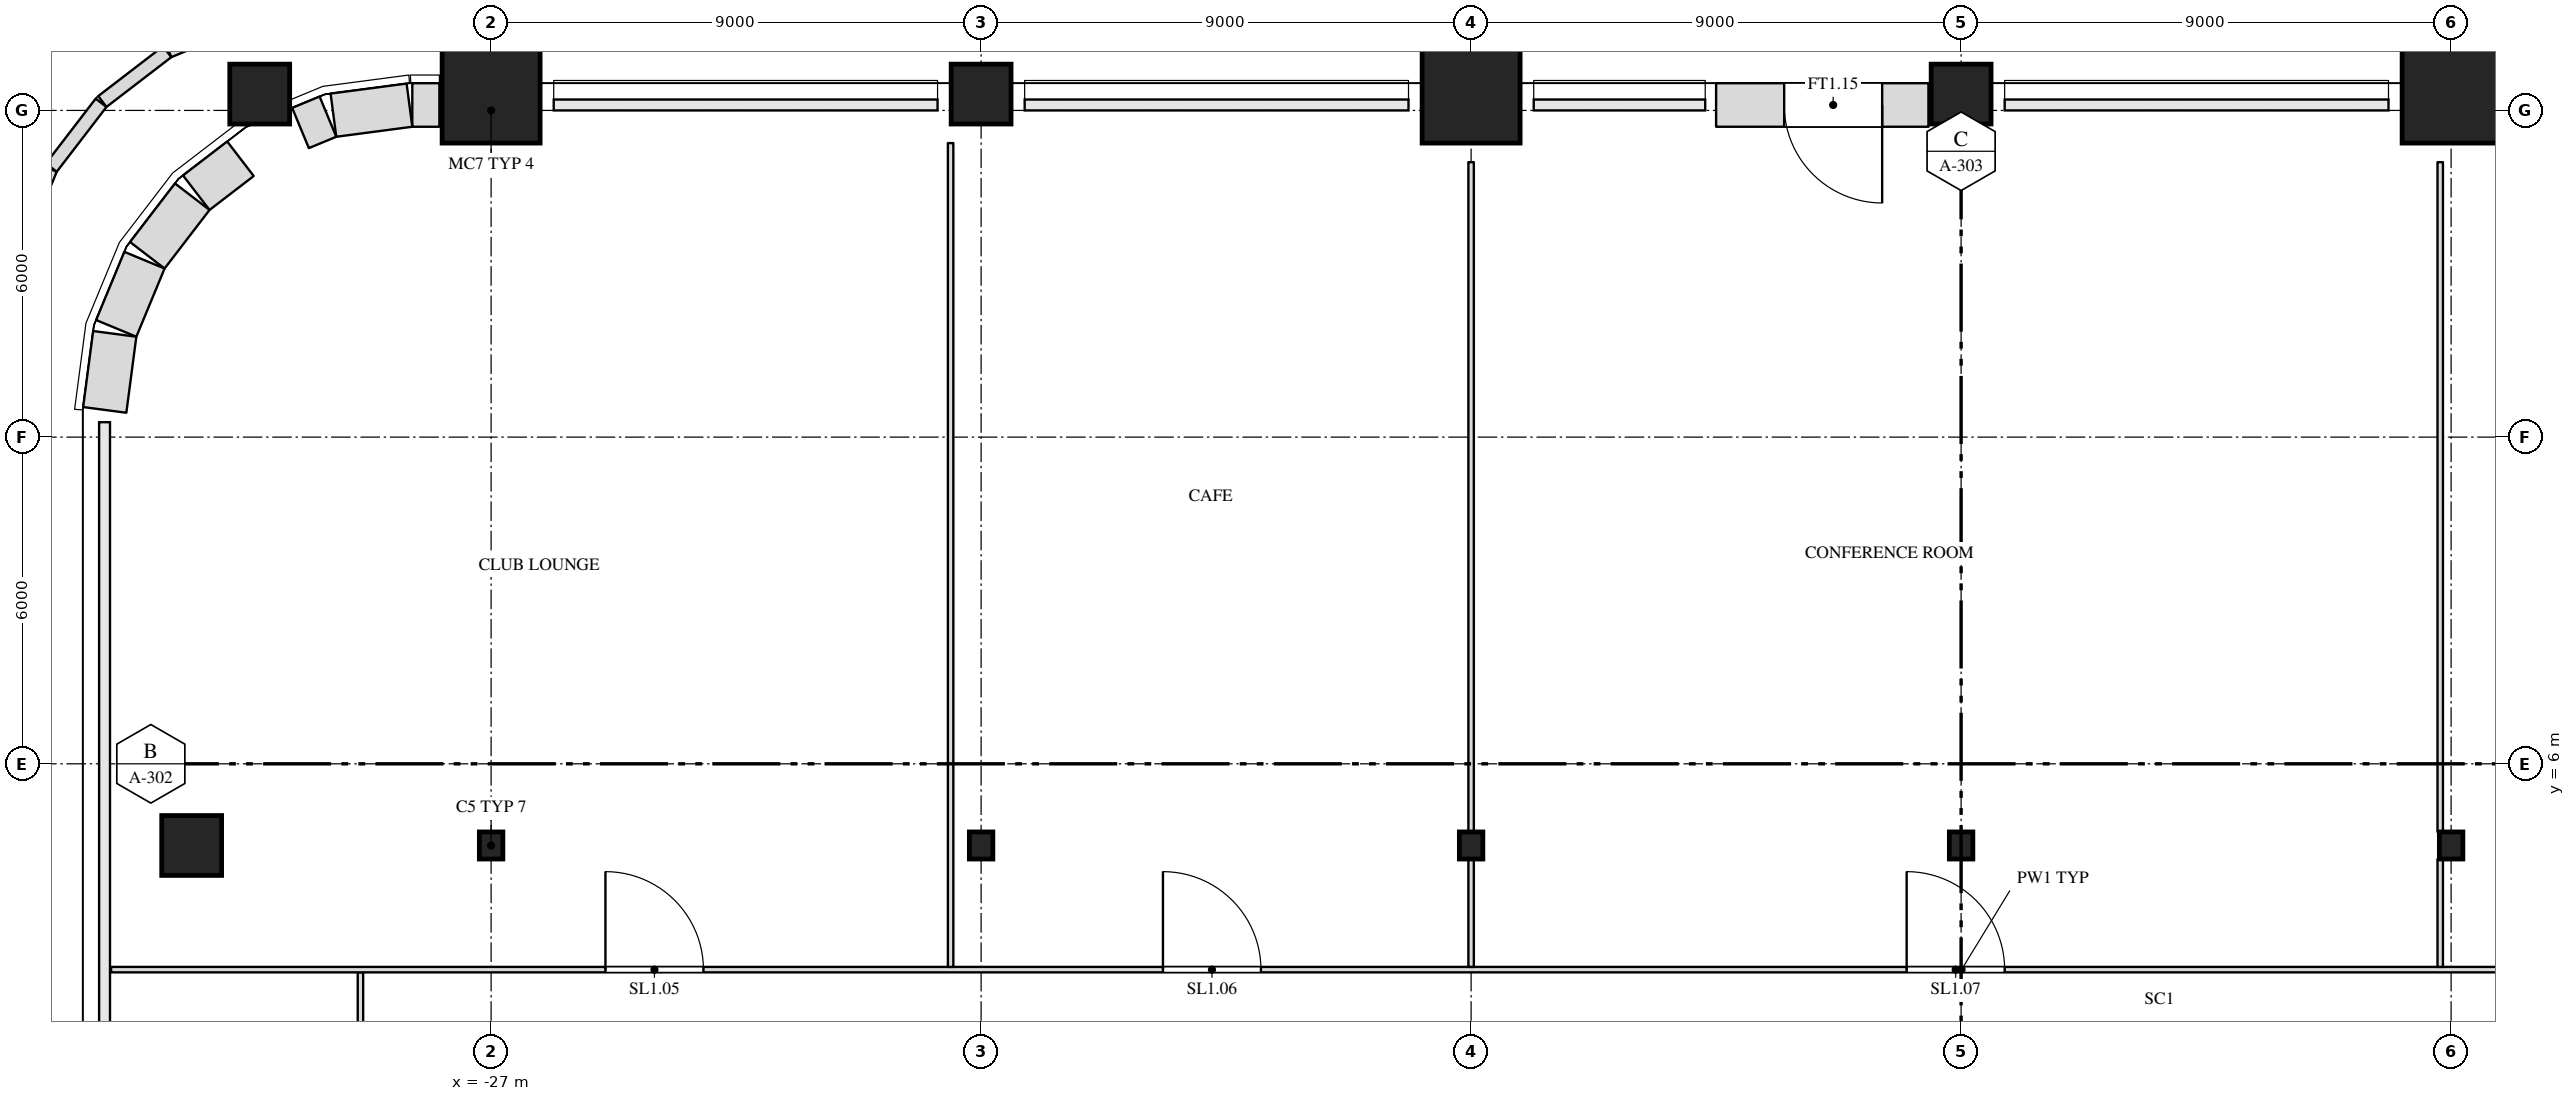
"""IFC4 building model, lengths in metres.
Left out: names, types, materials, properties, quantities, classifications, styles, units other than length and angle.
Written with IfcOpenShell. Run it as: python <this file> out.ifc"""

import sys

from ifc_helpers import new_model, si_unit, direction, frame, frame_2d, origin, origin_2d, place, context, subcontext, project, spatial, rectangle, i_section, extrude, clip, halfspace, element, fill, save


model = new_model("IFC4")
c1 = context("Model", 3, precision=1e-05, world=origin(), true_north=direction((0.0, 1.0)))
c2 = subcontext(c1, "Body", "Model", "MODEL_VIEW")
j1 = project(units=[si_unit("LENGTHUNIT", "METRE"), si_unit("PLANEANGLEUNIT", "RADIAN")], contexts=[c1])
p1 = place(None, origin())
s1 = spatial("IfcSite", under=j1, at=p1, CompositionType="ELEMENT")
p2 = place(p1, origin())
s2 = spatial("IfcBuilding", under=s1, at=p2, CompositionType="ELEMENT")
p3 = place(p2, frame((0.0, 0.0, 100.5)))
s3 = spatial("IfcBuildingStorey", under=s2, at=p3, CompositionType="ELEMENT", Elevation=100.5)
p4 = place(p3, frame((-32.5, 4.5, 0.0), z_axis=(0.0, 0.0, 1.0), x_axis=(1.0, 0.0, 0.0)))
e1 = element("IfcColumn", 1, at=p4, inside=s3, PredefinedType="COLUMN", context=c2, shape_type="SweptSolid", body=[
    extrude(rectangle(XDim=1.1, YDim=1.1, at=origin_2d()), origin(), (0.0, 0.0, 1.0), 4.0),
])
for number, where, z_axis, x_axis in (
    (2, (-27.0, 4.5, 0.0), (0.0, 0.0, 1.0), (1.0, 0.0, 0.0)),
    (3, (-18.0, 4.5, 0.0), (0.0, 0.0, 1.0), (1.0, 0.0, 0.0)),
    (4, (-9.0, 4.5, 0.0), (0.0, 0.0, 1.0), (1.0, 0.0, 0.0)),
    (5, (0.0, 4.5, 0.0), (0.0, 0.0, 1.0), (1.0, 0.0, 0.0)),
    (6, (9.0, 4.5, 0.0), (0.0, 0.0, 1.0), (1.0, 0.0, 0.0)),
):
    element("IfcColumn", number, at=place(p3, frame(where, z_axis=z_axis, x_axis=x_axis)), inside=s3, PredefinedType="COLUMN", context=c2, shape_type="SweptSolid", body=[
        extrude(i_section(OverallWidth=0.432, OverallDepth=0.498, WebThickness=0.056, FlangeThickness=0.089, at=origin_2d()), origin(), (0.0, 0.0, 1.0), 4.0),
    ])
p5 = place(p3, frame((-31.25, 18.0, 0.0), z_axis=(0.0, 0.242535625036, 0.970142500145), x_axis=(-1.0, 0.0, 0.0)))
e7 = element("IfcColumn", 7, at=p5, inside=s3, PredefinedType="COLUMN", context=c2, shape_type="Clipping", body=[
    clip(extrude(rectangle(XDim=1.1, YDim=1.1, at=origin_2d()), origin(), (0.0, 0.0, 1.0), 4.123), halfspace(frame((0.0, 0.0, 0.137)), True)),
])
p6 = place(p3, frame((-27.0, 18.0, 0.0), z_axis=(0.0, 0.242535625036, 0.970142500145), x_axis=(-1.0, 0.0, 0.0)))
e8 = element("IfcColumn", 8, at=p6, inside=s3, PredefinedType="COLUMN", context=c2, shape_type="Clipping", body=[
    clip(extrude(rectangle(XDim=1.8, YDim=1.8, at=origin_2d()), origin(), (0.0, 0.0, 1.0), 4.123), halfspace(frame((0.0, 0.0, 0.225)), True)),
])
p7 = place(p3, frame((-18.0, 18.0, 0.0), z_axis=(0.0, 0.242535625036, 0.970142500145), x_axis=(-1.0, 0.0, 0.0)))
e9 = element("IfcColumn", 9, at=p7, inside=s3, PredefinedType="COLUMN", context=c2, shape_type="Clipping", body=[
    clip(extrude(rectangle(XDim=1.1, YDim=1.1, at=origin_2d()), origin(), (0.0, 0.0, 1.0), 4.123), halfspace(frame((0.0, 0.0, 0.137)), True)),
])
p8 = place(p3, frame((-9.0, 18.0, 0.0), z_axis=(0.0, 0.242535625036, 0.970142500145), x_axis=(-1.0, 0.0, 0.0)))
e10 = element("IfcColumn", 10, at=p8, inside=s3, PredefinedType="COLUMN", context=c2, shape_type="Clipping", body=[
    clip(extrude(rectangle(XDim=1.8, YDim=1.8, at=origin_2d()), origin(), (0.0, 0.0, 1.0), 4.123), halfspace(frame((0.0, 0.0, 0.225)), True)),
])
p9 = place(p3, frame((0.0, 18.0, 0.0), z_axis=(0.0, 0.242535625036, 0.970142500145), x_axis=(-1.0, 0.0, 0.0)))
e11 = element("IfcColumn", 11, at=p9, inside=s3, PredefinedType="COLUMN", context=c2, shape_type="Clipping", body=[
    clip(extrude(rectangle(XDim=1.1, YDim=1.1, at=origin_2d()), origin(), (0.0, 0.0, 1.0), 4.123), halfspace(frame((0.0, 0.0, 0.137)), True)),
])
p10 = place(p3, frame((9.0, 18.0, 0.0), z_axis=(0.0, 0.242535625036, 0.970142500145), x_axis=(-1.0, 0.0, 0.0)))
e12 = element("IfcColumn", 12, at=p10, inside=s3, PredefinedType="COLUMN", context=c2, shape_type="Clipping", body=[
    clip(extrude(rectangle(XDim=1.8, YDim=1.8, at=origin_2d()), origin(), (0.0, 0.0, 1.0), 4.123), halfspace(frame((0.0, 0.0, 0.225)), True)),
])
p11 = place(p3, frame((-29.4, -13.95, 0.0), z_axis=(0.0, 0.0, 1.0), x_axis=(0.0, 1.0, 0.0)))
e13 = element("IfcWall", 13, at=p11, inside=s3, PredefinedType="PARTITIONING", context=c2, shape_type="SweptSolid", body=[
    extrude(rectangle(XDim=16.12, YDim=0.1, at=frame_2d((8.06, 0.0))), origin(), (0.0, 0.0, 1.0), 3.65),
])
p12 = place(p11, frame((7.55, 0.0, 0.0)))
e14 = element("IfcOpeningElement", 14, at=p12, cuts=e13, PredefinedType="OPENING", context=c2, shape_type="SweptSolid", body=[
    extrude(rectangle(XDim=1.0, YDim=2.1, at=frame_2d((0.5, 1.05))), frame((0.0, 0.062, 0.0), z_axis=(0.0, -1.0, 0.0), x_axis=(1.0, 0.0, 0.0)), (0.0, 0.0, 1.0), 0.124),
])
p13 = place(p3, frame((-33.98, 2.22, 0.0), z_axis=(0.0, 0.0, 1.0), x_axis=(1.0, 0.0, 0.0)))
e15 = element("IfcWall", 15, at=p13, inside=s3, PredefinedType="PARTITIONING", context=c2, shape_type="SweptSolid", body=[
    extrude(rectangle(XDim=67.976, YDim=0.1, at=frame_2d((33.988, 0.0))), origin(), (0.0, 0.0, 1.0), 3.65),
])
p14 = place(p13, frame((9.08, 0.0, 0.0)))
e16 = element("IfcOpeningElement", 16, at=p14, cuts=e15, PredefinedType="OPENING", context=c2, shape_type="SweptSolid", body=[
    extrude(rectangle(XDim=1.8, YDim=2.1, at=frame_2d((0.9, 1.05))), frame((0.0, 0.062, 0.0), z_axis=(0.0, -1.0, 0.0), x_axis=(1.0, 0.0, 0.0)), (0.0, 0.0, 1.0), 0.124),
])
p15 = place(p13, frame((19.32, 0.0, 0.0)))
e17 = element("IfcOpeningElement", 17, at=p15, cuts=e15, PredefinedType="OPENING", context=c2, shape_type="SweptSolid", body=[
    extrude(rectangle(XDim=1.8, YDim=2.1, at=frame_2d((0.9, 1.05))), frame((0.0, 0.062, 0.0), z_axis=(0.0, -1.0, 0.0), x_axis=(1.0, 0.0, 0.0)), (0.0, 0.0, 1.0), 0.124),
])
p16 = place(p13, frame((32.98, 0.0, 0.0)))
e18 = element("IfcOpeningElement", 18, at=p16, cuts=e15, PredefinedType="OPENING", context=c2, shape_type="SweptSolid", body=[
    extrude(rectangle(XDim=1.8, YDim=2.1, at=frame_2d((0.9, 1.05))), frame((0.0, 0.062, 0.0), z_axis=(0.0, -1.0, 0.0), x_axis=(1.0, 0.0, 0.0)), (0.0, 0.0, 1.0), 0.124),
])
p17 = place(p13, frame((52.03, 0.0, 0.0)))
e19 = element("IfcOpeningElement", 19, at=p17, cuts=e15, PredefinedType="OPENING", context=c2, shape_type="SweptSolid", body=[
    extrude(rectangle(XDim=1.0, YDim=2.1, at=frame_2d((0.5, 1.05))), frame((0.0, 0.062, 0.0), z_axis=(0.0, -1.0, 0.0), x_axis=(1.0, 0.0, 0.0)), (0.0, 0.0, 1.0), 0.124),
])
p18 = place(p13, frame((59.5, 0.0, 0.0)))
e20 = element("IfcOpeningElement", 20, at=p18, cuts=e15, PredefinedType="OPENING", context=c2, shape_type="SweptSolid", body=[
    extrude(rectangle(XDim=1.8, YDim=2.1, at=frame_2d((0.9, 1.05))), frame((0.0, 0.062, 0.0), z_axis=(0.0, -1.0, 0.0), x_axis=(1.0, 0.0, 0.0)), (0.0, 0.0, 1.0), 0.124),
])
p19 = place(p3, frame((-18.56, 2.27, 0.0), z_axis=(0.0, 0.0, 1.0), x_axis=(0.0, 1.0, 0.0)))
e21 = element("IfcWall", 21, at=p19, inside=s3, PredefinedType="PARTITIONING", context=c2, shape_type="SweptSolid", body=[
    extrude(rectangle(XDim=15.13, YDim=0.1, at=frame_2d((7.565, 0.0))), origin(), (0.0, 0.0, 1.0), 3.65),
])
p20 = place(p3, frame((-9.0, 2.27, 0.0), z_axis=(0.0, 0.0, 1.0), x_axis=(0.0, 1.0, 0.0)))
e22 = element("IfcWall", 22, at=p20, inside=s3, PredefinedType="PARTITIONING", context=c2, shape_type="SweptSolid", body=[
    extrude(rectangle(XDim=1.981, YDim=0.1, at=frame_2d((0.99, 0.0))), origin(), (0.0, 0.0, 1.0), 3.65),
])
p21 = place(p3, frame((-9.0, 4.749, 0.0), z_axis=(0.0, 0.0, 1.0), x_axis=(0.0, 1.0, 0.0)))
e23 = element("IfcWall", 23, at=p21, inside=s3, PredefinedType="PARTITIONING", context=c2, shape_type="SweptSolid", body=[
    extrude(rectangle(XDim=12.301, YDim=0.1, at=frame_2d((6.15, 0.0))), origin(), (0.0, 0.0, 1.0), 3.65),
])
p22 = place(p3, frame((8.8, 2.27, 0.0), z_axis=(0.0, 0.0, 1.0), x_axis=(0.0, 1.0, 0.0)))
e24 = element("IfcWall", 24, at=p22, inside=s3, PredefinedType="PARTITIONING", context=c2, shape_type="SweptSolid", body=[
    extrude(rectangle(XDim=1.981, YDim=0.1, at=frame_2d((0.99, 0.0))), origin(), (0.0, 0.0, 1.0), 3.65),
])
p23 = place(p3, frame((8.8, 4.749, 0.0), z_axis=(0.0, 0.0, 1.0), x_axis=(0.0, 1.0, 0.0)))
e25 = element("IfcWall", 25, at=p23, inside=s3, PredefinedType="PARTITIONING", context=c2, shape_type="SweptSolid", body=[
    extrude(rectangle(XDim=12.301, YDim=0.1, at=frame_2d((6.15, 0.0))), origin(), (0.0, 0.0, 1.0), 3.65),
])
p24 = place(p3, frame((-0.6, 18.1, 0.0), z_axis=(0.0, 0.0, 1.0), x_axis=(-1.0, 0.0, 0.0)))
e26 = element("IfcWall", 26, at=p24, inside=s3, PredefinedType="SOLIDWALL", context=c2, shape_type="SweptSolid", body=[
    extrude(rectangle(XDim=3.9, YDim=0.8, at=frame_2d((1.95, 0.0))), origin(), (0.0, 0.0, 1.0), 3.65),
])
p25 = place(p24, frame((0.85, 0.0, 0.0)))
e27 = element("IfcOpeningElement", 27, at=p25, cuts=e26, PredefinedType="OPENING", context=c2, shape_type="SweptSolid", body=[
    extrude(rectangle(XDim=1.8, YDim=2.4, at=frame_2d((0.9, 1.2))), frame((0.0, 0.412, 0.0), z_axis=(0.0, -1.0, 0.0), x_axis=(1.0, 0.0, 0.0)), (0.0, 0.0, 1.0), 0.824),
])
p26 = place(p3, frame((-27.95, 18.1, 0.0), z_axis=(0.0, 0.0, 1.0), x_axis=(-1.0, 0.0, 0.0)))
e28 = element("IfcWall", 28, at=p26, inside=s3, PredefinedType="SOLIDWALL", context=c2, shape_type="SweptSolid", body=[
    extrude(rectangle(XDim=0.498, YDim=0.8, at=frame_2d((0.249, 0.0))), origin(), (0.0, 0.0, 1.0), 3.65),
])
p27 = place(p3, frame((-28.5, 18.097, 0.0), z_axis=(0.0, 0.0, 1.0), x_axis=(-0.99144603414, -0.130517283865, 0.0)))
e29 = element("IfcWall", 29, at=p27, inside=s3, PredefinedType="SOLIDWALL", context=c2, shape_type="SweptSolid", body=[
    extrude(rectangle(XDim=1.408, YDim=0.8, at=frame_2d((0.704, 0.0))), origin(), (0.0, 0.0, 1.0), 3.65),
])
p28 = place(p3, frame((-29.997, 17.886, 0.0), z_axis=(0.0, 0.0, 1.0), x_axis=(-0.923738247693, -0.383024346158, 0.0)))
e30 = element("IfcWall", 30, at=p28, inside=s3, PredefinedType="SOLIDWALL", context=c2, shape_type="SweptSolid", body=[
    extrude(rectangle(XDim=0.545, YDim=0.8, at=frame_2d((0.272, 0.0))), origin(), (0.0, 0.0, 1.0), 3.65),
])
p29 = place(p3, frame((-31.604, 17.112, 0.0), z_axis=(0.0, 0.0, 1.0), x_axis=(-0.793191379171, -0.608972442733, 0.0)))
e31 = element("IfcWall", 31, at=p29, inside=s3, PredefinedType="SOLIDWALL", context=c2, shape_type="SweptSolid", body=[
    extrude(rectangle(XDim=1.023, YDim=0.8, at=frame_2d((0.512, 0.0))), origin(), (0.0, 0.0, 1.0), 3.65),
])
p30 = place(p3, frame((-32.489, 16.416, 0.0), z_axis=(0.0, 0.0, 1.0), x_axis=(-0.608866226366, -0.793272915452, 0.0)))
e32 = element("IfcWall", 32, at=p30, inside=s3, PredefinedType="SOLIDWALL", context=c2, shape_type="SweptSolid", body=[
    extrude(rectangle(XDim=1.356, YDim=0.8, at=frame_2d((0.678, 0.0))), origin(), (0.0, 0.0, 1.0), 3.65),
])
p31 = place(p3, frame((-33.367, 15.25, 0.0), z_axis=(0.0, 0.0, 1.0), x_axis=(-0.38276009378, -0.923847774587, 0.0)))
e33 = element("IfcWall", 33, at=p31, inside=s3, PredefinedType="SOLIDWALL", context=c2, shape_type="SweptSolid", body=[
    extrude(rectangle(XDim=1.355, YDim=0.8, at=frame_2d((0.678, 0.0))), origin(), (0.0, 0.0, 1.0), 3.65),
])
p32 = place(p3, frame((-33.913, 13.896, 0.0), z_axis=(0.0, 0.0, 1.0), x_axis=(-0.130517283865, -0.99144603414, 0.0)))
e34 = element("IfcWall", 34, at=p32, inside=s3, PredefinedType="SOLIDWALL", context=c2, shape_type="SweptSolid", body=[
    extrude(rectangle(XDim=1.408, YDim=0.8, at=frame_2d((0.704, 0.0))), origin(), (0.0, 0.0, 1.0), 3.65),
])
for number, where, z_axis, x_axis in (
    (35, (-31.535, 19.667, 0.0), (0.0, 0.0, 1.0), (-0.924, -0.383, 0.0)),
    (36, (-32.95, 19.077, 0.0), (0.0, 0.0, 1.0), (-0.793, -0.609, 0.0)),
    (37, (-34.164, 18.14, 0.0), (0.0, 0.0, 1.0), (-0.609, -0.793, 0.0)),
    (38, (-35.093, 16.922, 0.0), (0.0, 0.0, 1.0), (-0.383, -0.924, 0.0)),
):
    element("IfcWall", number, at=place(p3, frame(where, z_axis=z_axis, x_axis=x_axis)), inside=s3, PredefinedType="PARAPET", context=c2, shape_type="SweptSolid", body=[
        extrude(rectangle(XDim=1.5, YDim=0.25, at=frame_2d((0.75, 0.0))), origin(), (0.0, 0.0, 1.0), 1.1),
    ])
p33 = place(p14, origin())
e39 = element("IfcDoor", 39, at=p33, inside=s3, OperationType="DOUBLE_DOOR_SINGLE_SWING", PredefinedType="DOOR", context=c2, shape_type="SweptSolid", body=[
    extrude(rectangle(XDim=1.8, YDim=2.1, at=frame_2d((0.9, 1.05))), frame((0.0, 0.025, 0.0), z_axis=(0.0, -1.0, 0.0), x_axis=(1.0, 0.0, 0.0)), (0.0, 0.0, 1.0), 0.05),
])
fill(e16, e39)
p34 = place(p15, origin())
e40 = element("IfcDoor", 40, at=p34, inside=s3, OperationType="DOUBLE_DOOR_SINGLE_SWING", PredefinedType="DOOR", context=c2, shape_type="SweptSolid", body=[
    extrude(rectangle(XDim=1.8, YDim=2.1, at=frame_2d((0.9, 1.05))), frame((0.0, 0.025, 0.0), z_axis=(0.0, -1.0, 0.0), x_axis=(1.0, 0.0, 0.0)), (0.0, 0.0, 1.0), 0.05),
])
fill(e17, e40)
p35 = place(p16, origin())
e41 = element("IfcDoor", 41, at=p35, inside=s3, OperationType="DOUBLE_DOOR_SINGLE_SWING", PredefinedType="DOOR", context=c2, shape_type="SweptSolid", body=[
    extrude(rectangle(XDim=1.8, YDim=2.1, at=frame_2d((0.9, 1.05))), frame((0.0, 0.025, 0.0), z_axis=(0.0, -1.0, 0.0), x_axis=(1.0, 0.0, 0.0)), (0.0, 0.0, 1.0), 0.05),
])
fill(e18, e41)
p36 = place(p25, origin())
e42 = element("IfcDoor", 42, at=p36, inside=s3, OperationType="DOUBLE_DOOR_SINGLE_SWING", PredefinedType="DOOR", context=c2, shape_type="SweptSolid", body=[
    extrude(rectangle(XDim=1.8, YDim=2.4, at=frame_2d((0.9, 1.2))), frame((0.0, 0.025, 0.0), z_axis=(0.0, -1.0, 0.0), x_axis=(1.0, 0.0, 0.0)), (0.0, 0.0, 1.0), 0.05),
])
fill(e27, e42)
save(model, sys.argv[1])
